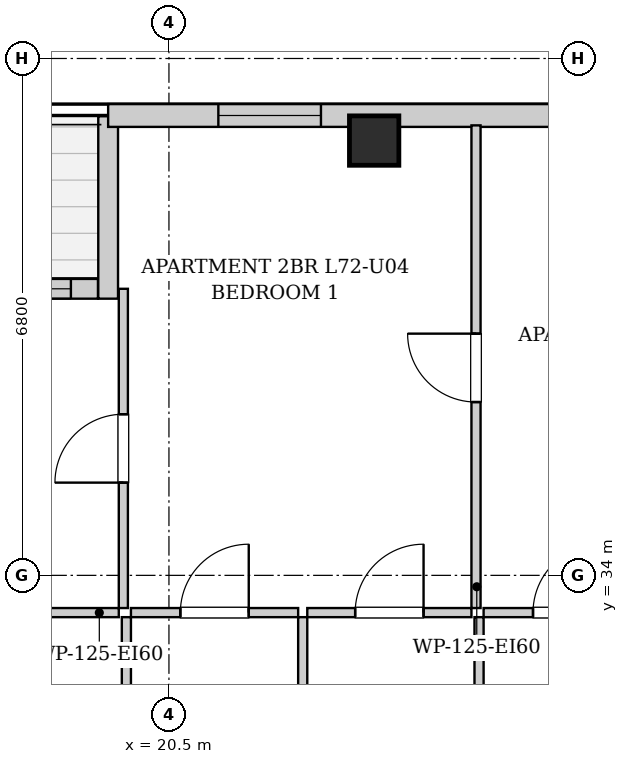
"""IFC4 building model, lengths in metres.
Left out: names, types, materials, properties, quantities, classifications, styles, units other than length and angle.
Written with IfcOpenShell. Run it as: python <this file> out.ifc"""

import sys

from ifc_helpers import new_model, si_unit, direction, frame, frame_2d, origin, origin_2d, place, context, subcontext, project, spatial, rectangle, extrude, element, fill, save


model = new_model("IFC4")
c1 = context("Model", 3, precision=1e-05, world=origin(), true_north=direction((0.0, 1.0)))
c2 = subcontext(c1, "Body", "Model", "MODEL_VIEW")
j1 = project(units=[si_unit("LENGTHUNIT", "METRE"), si_unit("PLANEANGLEUNIT", "RADIAN")], contexts=[c1])
p1 = place(None, origin())
s1 = spatial("IfcSite", under=j1, at=p1, CompositionType="ELEMENT")
p2 = place(p1, origin())
s2 = spatial("IfcBuilding", under=s1, at=p2, CompositionType="ELEMENT")
p3 = place(p2, frame((0.0, 0.0, 247.9)))
s3 = spatial("IfcBuildingStorey", under=s2, at=p3, CompositionType="ELEMENT", Elevation=247.9)
p4 = place(p3, frame((23.2, 39.72, 0.0), z_axis=(0.0, 0.0, 1.0), x_axis=(1.0, 0.0, 0.0)))
e1 = element("IfcColumn", 1, at=p4, inside=s3, PredefinedType="COLUMN", context=c2, shape_type="SweptSolid", body=[
    extrude(rectangle(XDim=0.65, YDim=0.65, at=origin_2d()), origin(), (0.0, 0.0, 1.0), 3.4),
])
p5 = place(p3, frame((14.534, 37.77, 0.0), z_axis=(0.0, 0.0, 1.0), x_axis=(1.0, 0.0, 0.0)))
e2 = element("IfcWall", 2, at=p5, inside=s3, PredefinedType="SOLIDWALL", context=c2, shape_type="SweptSolid", body=[
    extrude(rectangle(XDim=5.032, YDim=0.26, at=frame_2d((2.516, 0.0))), origin(), (0.0, 0.0, 1.0), 3.14),
])
p6 = place(p5, frame((1.966, 0.0, 0.0)))
e3 = element("IfcOpeningElement", 3, at=p6, cuts=e2, PredefinedType="OPENING", context=c2, shape_type="SweptSolid", body=[
    extrude(rectangle(XDim=1.1, YDim=2.0, at=frame_2d((0.55, 1.0))), frame((0.0, 0.14, 0.0), z_axis=(0.0, -1.0, 0.0), x_axis=(1.0, 0.0, 0.0)), (0.0, 0.0, 1.0), 0.28),
])
p7 = place(p5, frame((3.326, 0.0, 0.55)))
e4 = element("IfcOpeningElement", 4, at=p7, cuts=e2, PredefinedType="OPENING", context=c2, shape_type="SweptSolid", body=[
    extrude(rectangle(XDim=1.35, YDim=1.2, at=frame_2d((0.675, 0.6))), frame((0.0, 0.14, 0.0), z_axis=(0.0, -1.0, 0.0), x_axis=(1.0, 0.0, 0.0)), (0.0, 0.0, 1.0), 0.28),
])
p8 = place(p3, frame((19.7, 37.64, 0.0), z_axis=(0.0, 0.0, 1.0), x_axis=(0.0, 1.0, 0.0)))
e5 = element("IfcWall", 5, at=p8, inside=s3, PredefinedType="SOLIDWALL", context=c2, shape_type="SweptSolid", body=[
    extrude(rectangle(XDim=2.4, YDim=0.26, at=frame_2d((1.2, 0.0))), origin(), (0.0, 0.0, 1.0), 3.14),
])
p9 = place(p3, frame((19.7, 40.05, 0.0), z_axis=(0.0, 0.0, 1.0), x_axis=(1.0, 0.0, 0.0)))
e6 = element("IfcWall", 6, at=p9, inside=s3, PredefinedType="SOLIDWALL", context=c2, shape_type="SweptSolid", body=[
    extrude(rectangle(XDim=10.25, YDim=0.3, at=frame_2d((5.125, 0.0))), origin(), (0.0, 0.0, 1.0), 3.14),
])
p10 = place(p9, frame((1.45, 0.0, 0.55)))
e7 = element("IfcOpeningElement", 7, at=p10, cuts=e6, PredefinedType="OPENING", context=c2, shape_type="SweptSolid", body=[
    extrude(rectangle(XDim=1.35, YDim=1.2, at=frame_2d((0.675, 0.6))), frame((0.0, 0.16, 0.0), z_axis=(0.0, -1.0, 0.0), x_axis=(1.0, 0.0, 0.0)), (0.0, 0.0, 1.0), 0.32),
])
p11 = place(p9, frame((7.8, 0.0, 0.55)))
e8 = element("IfcOpeningElement", 8, at=p11, cuts=e6, PredefinedType="OPENING", context=c2, shape_type="SweptSolid", body=[
    extrude(rectangle(XDim=1.35, YDim=1.2, at=frame_2d((0.675, 0.6))), frame((0.0, 0.16, 0.0), z_axis=(0.0, -1.0, 0.0), x_axis=(1.0, 0.0, 0.0)), (0.0, 0.0, 1.0), 0.32),
])
p12 = place(p3, frame((19.94, 30.6, 0.0), z_axis=(0.0, 0.0, 1.0), x_axis=(0.0, 1.0, 0.0)))
e9 = element("IfcWall", 9, at=p12, inside=s3, PredefinedType="PARTITIONING", context=c2, shape_type="SweptSolid", body=[
    extrude(rectangle(XDim=2.85, YDim=0.12, at=frame_2d((1.425, 0.0))), origin(), (0.0, 0.0, 1.0), 3.14),
])
p13 = place(p12, frame((0.975, 0.0, 0.0)))
e10 = element("IfcOpeningElement", 10, at=p13, cuts=e9, PredefinedType="OPENING", context=c2, shape_type="SweptSolid", body=[
    extrude(rectangle(XDim=0.9, YDim=2.05, at=frame_2d((0.45, 1.025))), frame((0.0, 0.07, 0.0), z_axis=(0.0, -1.0, 0.0), x_axis=(1.0, 0.0, 0.0)), (0.0, 0.0, 1.0), 0.14),
])
p14 = place(p3, frame((15.978, 33.51, 0.0), z_axis=(0.0, 0.0, 1.0), x_axis=(1.0, 0.0, 0.0)))
e11 = element("IfcWall", 11, at=p14, inside=s3, PredefinedType="PARTITIONING", context=c2, shape_type="SweptSolid", body=[
    extrude(rectangle(XDim=3.862, YDim=0.12, at=frame_2d((1.931, 0.0))), origin(), (0.0, 0.0, 1.0), 3.14),
])
p15 = place(p14, frame((1.481, 0.0, 0.0)))
e12 = element("IfcOpeningElement", 12, at=p15, cuts=e11, PredefinedType="OPENING", context=c2, shape_type="SweptSolid", body=[
    extrude(rectangle(XDim=0.9, YDim=2.05, at=frame_2d((0.45, 1.025))), frame((0.0, 0.07, 0.0), z_axis=(0.0, -1.0, 0.0), x_axis=(1.0, 0.0, 0.0)), (0.0, 0.0, 1.0), 0.14),
])
p16 = place(p3, frame((22.26, 30.6, 0.0), z_axis=(0.0, 0.0, 1.0), x_axis=(0.0, 1.0, 0.0)))
e13 = element("IfcWall", 13, at=p16, inside=s3, PredefinedType="PARTITIONING", context=c2, shape_type="SweptSolid", body=[
    extrude(rectangle(XDim=2.85, YDim=0.12, at=frame_2d((1.425, 0.0))), origin(), (0.0, 0.0, 1.0), 3.14),
])
p17 = place(p16, frame((0.975, 0.0, 0.0)))
e14 = element("IfcOpeningElement", 14, at=p17, cuts=e13, PredefinedType="OPENING", context=c2, shape_type="SweptSolid", body=[
    extrude(rectangle(XDim=0.9, YDim=2.05, at=frame_2d((0.45, 1.025))), frame((0.0, 0.07, 0.0), z_axis=(0.0, -1.0, 0.0), x_axis=(1.0, 0.0, 0.0)), (0.0, 0.0, 1.0), 0.14),
])
p18 = place(p3, frame((20.0, 33.51, 0.0), z_axis=(0.0, 0.0, 1.0), x_axis=(1.0, 0.0, 0.0)))
e15 = element("IfcWall", 15, at=p18, inside=s3, PredefinedType="PARTITIONING", context=c2, shape_type="SweptSolid", body=[
    extrude(rectangle(XDim=2.2, YDim=0.12, at=frame_2d((1.1, 0.0))), origin(), (0.0, 0.0, 1.0), 3.14),
])
p19 = place(p18, frame((0.65, 0.0, 0.0)))
e16 = element("IfcOpeningElement", 16, at=p19, cuts=e15, PredefinedType="OPENING", context=c2, shape_type="SweptSolid", body=[
    extrude(rectangle(XDim=0.9, YDim=2.05, at=frame_2d((0.45, 1.025))), frame((0.0, 0.07, 0.0), z_axis=(0.0, -1.0, 0.0), x_axis=(1.0, 0.0, 0.0)), (0.0, 0.0, 1.0), 0.14),
])
p20 = place(p3, frame((24.58, 30.6, 0.0), z_axis=(0.0, 0.0, 1.0), x_axis=(0.0, 1.0, 0.0)))
e17 = element("IfcWall", 17, at=p20, inside=s3, PredefinedType="PARTITIONING", context=c2, shape_type="SweptSolid", body=[
    extrude(rectangle(XDim=2.85, YDim=0.12, at=frame_2d((1.425, 0.0))), origin(), (0.0, 0.0, 1.0), 3.14),
])
p21 = place(p20, frame((0.975, 0.0, 0.0)))
e18 = element("IfcOpeningElement", 18, at=p21, cuts=e17, PredefinedType="OPENING", context=c2, shape_type="SweptSolid", body=[
    extrude(rectangle(XDim=0.9, YDim=2.05, at=frame_2d((0.45, 1.025))), frame((0.0, 0.07, 0.0), z_axis=(0.0, -1.0, 0.0), x_axis=(1.0, 0.0, 0.0)), (0.0, 0.0, 1.0), 0.14),
])
p22 = place(p3, frame((22.32, 33.51, 0.0), z_axis=(0.0, 0.0, 1.0), x_axis=(1.0, 0.0, 0.0)))
e19 = element("IfcWall", 19, at=p22, inside=s3, PredefinedType="PARTITIONING", context=c2, shape_type="SweptSolid", body=[
    extrude(rectangle(XDim=2.16, YDim=0.12, at=frame_2d((1.08, 0.0))), origin(), (0.0, 0.0, 1.0), 3.14),
])
p23 = place(p22, frame((0.63, 0.0, 0.0)))
e20 = element("IfcOpeningElement", 20, at=p23, cuts=e19, PredefinedType="OPENING", context=c2, shape_type="SweptSolid", body=[
    extrude(rectangle(XDim=0.9, YDim=2.05, at=frame_2d((0.45, 1.025))), frame((0.0, 0.07, 0.0), z_axis=(0.0, -1.0, 0.0), x_axis=(1.0, 0.0, 0.0)), (0.0, 0.0, 1.0), 0.14),
])
p24 = place(p3, frame((24.64, 33.51, 0.0), z_axis=(0.0, 0.0, 1.0), x_axis=(1.0, 0.0, 0.0)))
e21 = element("IfcWall", 21, at=p24, inside=s3, PredefinedType="PARTITIONING", context=c2, shape_type="SweptSolid", body=[
    extrude(rectangle(XDim=2.2, YDim=0.12, at=frame_2d((1.1, 0.0))), origin(), (0.0, 0.0, 1.0), 3.14),
])
p25 = place(p24, frame((0.65, 0.0, 0.0)))
e22 = element("IfcOpeningElement", 22, at=p25, cuts=e21, PredefinedType="OPENING", context=c2, shape_type="SweptSolid", body=[
    extrude(rectangle(XDim=0.9, YDim=2.05, at=frame_2d((0.45, 1.025))), frame((0.0, 0.07, 0.0), z_axis=(0.0, -1.0, 0.0), x_axis=(1.0, 0.0, 0.0)), (0.0, 0.0, 1.0), 0.14),
])
p26 = place(p3, frame((19.9, 33.57, 0.0), z_axis=(0.0, 0.0, 1.0), x_axis=(0.0, 1.0, 0.0)))
e23 = element("IfcWall", 23, at=p26, inside=s3, PredefinedType="PARTITIONING", context=c2, shape_type="SweptSolid", body=[
    extrude(rectangle(XDim=4.2, YDim=0.12, at=frame_2d((2.1, 0.0))), origin(), (0.0, 0.0, 1.0), 3.14),
])
p27 = place(p26, frame((1.65, 0.0, 0.0)))
e24 = element("IfcOpeningElement", 24, at=p27, cuts=e23, PredefinedType="OPENING", context=c2, shape_type="SweptSolid", body=[
    extrude(rectangle(XDim=0.9, YDim=2.05, at=frame_2d((0.45, 1.025))), frame((0.0, 0.07, 0.0), z_axis=(0.0, -1.0, 0.0), x_axis=(1.0, 0.0, 0.0)), (0.0, 0.0, 1.0), 0.14),
])
p28 = place(p3, frame((24.54, 33.57, 0.0), z_axis=(0.0, 0.0, 1.0), x_axis=(0.0, 1.0, 0.0)))
e25 = element("IfcWall", 25, at=p28, inside=s3, PredefinedType="PARTITIONING", context=c2, shape_type="SweptSolid", body=[
    extrude(rectangle(XDim=6.35, YDim=0.12, at=frame_2d((3.175, 0.0))), origin(), (0.0, 0.0, 1.0), 3.14),
])
p29 = place(p28, frame((2.71, 0.0, 0.0)))
e26 = element("IfcOpeningElement", 26, at=p29, cuts=e25, PredefinedType="OPENING", context=c2, shape_type="SweptSolid", body=[
    extrude(rectangle(XDim=0.9, YDim=2.05, at=frame_2d((0.45, 1.025))), frame((0.0, 0.07, 0.0), z_axis=(0.0, -1.0, 0.0), x_axis=(1.0, 0.0, 0.0)), (0.0, 0.0, 1.0), 0.14),
])
p30 = place(p19, origin())
e27 = element("IfcDoor", 27, at=p30, inside=s3, OperationType="SINGLE_SWING_RIGHT", PredefinedType="DOOR", context=c2, shape_type="SweptSolid", body=[
    extrude(rectangle(XDim=0.9, YDim=2.05, at=frame_2d((0.45, 1.025))), frame((0.0, 0.025, 0.0), z_axis=(0.0, -1.0, 0.0), x_axis=(1.0, 0.0, 0.0)), (0.0, 0.0, 1.0), 0.05),
])
fill(e16, e27)
p31 = place(p23, origin())
e28 = element("IfcDoor", 28, at=p31, inside=s3, OperationType="SINGLE_SWING_RIGHT", PredefinedType="DOOR", context=c2, shape_type="SweptSolid", body=[
    extrude(rectangle(XDim=0.9, YDim=2.05, at=frame_2d((0.45, 1.025))), frame((0.0, 0.025, 0.0), z_axis=(0.0, -1.0, 0.0), x_axis=(1.0, 0.0, 0.0)), (0.0, 0.0, 1.0), 0.05),
])
fill(e20, e28)
p32 = place(p25, origin())
e29 = element("IfcDoor", 29, at=p32, inside=s3, OperationType="SINGLE_SWING_RIGHT", PredefinedType="DOOR", context=c2, shape_type="SweptSolid", body=[
    extrude(rectangle(XDim=0.9, YDim=2.05, at=frame_2d((0.45, 1.025))), frame((0.0, 0.025, 0.0), z_axis=(0.0, -1.0, 0.0), x_axis=(1.0, 0.0, 0.0)), (0.0, 0.0, 1.0), 0.05),
])
fill(e22, e29)
p33 = place(p27, origin())
e30 = element("IfcDoor", 30, at=p33, inside=s3, OperationType="SINGLE_SWING_LEFT", PredefinedType="DOOR", context=c2, shape_type="SweptSolid", body=[
    extrude(rectangle(XDim=0.9, YDim=2.05, at=frame_2d((0.45, 1.025))), frame((0.0, 0.025, 0.0), z_axis=(0.0, -1.0, 0.0), x_axis=(1.0, 0.0, 0.0)), (0.0, 0.0, 1.0), 0.05),
])
fill(e24, e30)
p34 = place(p29, origin())
e31 = element("IfcDoor", 31, at=p34, inside=s3, OperationType="SINGLE_SWING_RIGHT", PredefinedType="DOOR", context=c2, shape_type="SweptSolid", body=[
    extrude(rectangle(XDim=0.9, YDim=2.05, at=frame_2d((0.45, 1.025))), frame((0.0, 0.025, 0.0), z_axis=(0.0, -1.0, 0.0), x_axis=(1.0, 0.0, 0.0)), (0.0, 0.0, 1.0), 0.05),
])
fill(e26, e31)
p35 = place(p7, origin())
e32 = element("IfcWindow", 32, at=p35, inside=s3, PartitioningType="SINGLE_PANEL", PredefinedType="WINDOW", context=c2, shape_type="SweptSolid", body=[
    extrude(rectangle(XDim=1.35, YDim=1.2, at=frame_2d((0.675, 0.6))), frame((0.0, 0.03, 0.0), z_axis=(0.0, -1.0, 0.0), x_axis=(1.0, 0.0, 0.0)), (0.0, 0.0, 1.0), 0.06),
])
fill(e4, e32)
p36 = place(p10, origin())
e33 = element("IfcWindow", 33, at=p36, inside=s3, PartitioningType="SINGLE_PANEL", PredefinedType="WINDOW", context=c2, shape_type="SweptSolid", body=[
    extrude(rectangle(XDim=1.35, YDim=1.2, at=frame_2d((0.675, 0.6))), frame((0.0, 0.03, 0.0), z_axis=(0.0, -1.0, 0.0), x_axis=(1.0, 0.0, 0.0)), (0.0, 0.0, 1.0), 0.06),
])
fill(e7, e33)
save(model, sys.argv[1])
